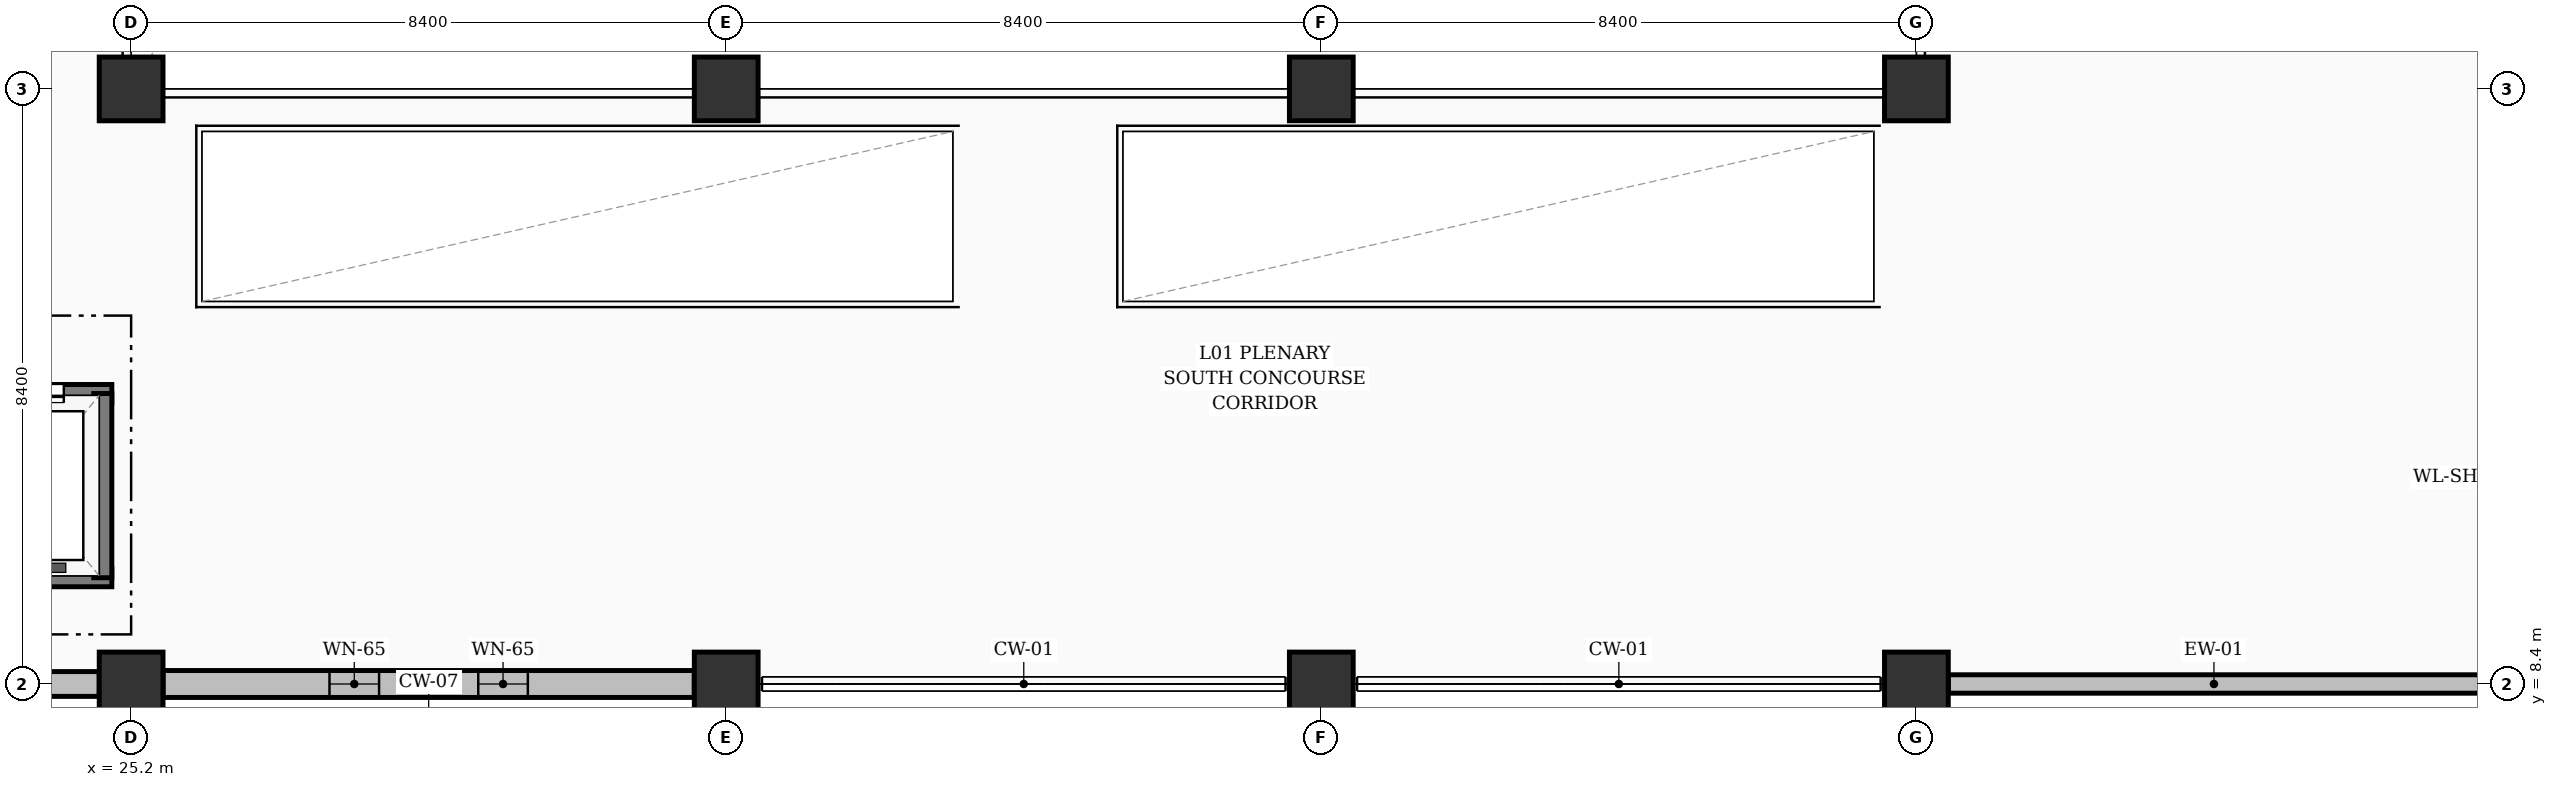
"""IFC4 building model, lengths in metres.
Left out: names, types, materials, properties, quantities, classifications, styles, units other than length and angle.
Written with IfcOpenShell. Run it as: python <this file> out.ifc"""

import sys

from ifc_helpers import new_model, si_unit, direction, frame, frame_2d, origin, origin_2d, place, context, subcontext, project, spatial, rectangle, extrude, element, fill, save


model = new_model("IFC4")
c1 = context("Model", 3, precision=1e-05, world=origin(), true_north=direction((0.0, 1.0)))
c2 = subcontext(c1, "Body", "Model", "MODEL_VIEW")
j1 = project(units=[si_unit("LENGTHUNIT", "METRE"), si_unit("PLANEANGLEUNIT", "RADIAN")], contexts=[c1])
p1 = place(None, origin())
s1 = spatial("IfcSite", under=j1, at=p1, CompositionType="ELEMENT")
p2 = place(p1, origin())
s2 = spatial("IfcBuilding", under=s1, at=p2, CompositionType="ELEMENT")
p3 = place(p2, frame((0.0, 0.0, 3.92)))
s3 = spatial("IfcBuildingStorey", under=s2, at=p3, CompositionType="ELEMENT", Elevation=3.92)
for number, where, z_axis, x_axis in (
    (1, (25.2, 8.4, 0.0), (0.0, 0.0, 1.0), (1.0, 0.0, 0.0)),
    (2, (25.2, 16.8, 0.0), (0.0, 0.0, 1.0), (1.0, 0.0, 0.0)),
    (3, (33.6, 8.4, 0.0), (0.0, 0.0, 1.0), (1.0, 0.0, 0.0)),
    (4, (33.6, 16.8, 0.0), (0.0, 0.0, 1.0), (1.0, 0.0, 0.0)),
    (5, (42.0, 8.4, 0.0), (0.0, 0.0, 1.0), (1.0, 0.0, 0.0)),
    (6, (42.0, 16.8, 0.0), (0.0, 0.0, 1.0), (1.0, 0.0, 0.0)),
    (7, (50.4, 8.4, 0.0), (0.0, 0.0, 1.0), (1.0, 0.0, 0.0)),
    (8, (50.4, 16.8, 0.0), (0.0, 0.0, 1.0), (1.0, 0.0, 0.0)),
):
    element("IfcColumn", number, at=place(p3, frame(where, z_axis=z_axis, x_axis=x_axis)), inside=s3, PredefinedType="COLUMN", context=c2, shape_type="SweptSolid", body=[
        extrude(rectangle(XDim=0.9, YDim=0.9, at=origin_2d()), origin(), (0.0, 0.0, 1.0), 3.64),
    ])
p4 = place(p3, frame((17.251, 8.4, 0.0), z_axis=(0.0, 0.0, 1.0), x_axis=(1.0, 0.0, 0.0)))
e9 = element("IfcWall", 9, at=p4, inside=s3, PredefinedType="SOLIDWALL", context=c2, shape_type="SweptSolid", body=[
    extrude(rectangle(XDim=7.498, YDim=0.35, at=frame_2d((3.749, 0.0))), origin(), (0.0, 0.0, 1.0), 2.445),
])
p5 = place(p3, frame((25.651, 8.4, 0.0), z_axis=(0.0, 0.0, 1.0), x_axis=(1.0, 0.0, 0.0)))
e10 = element("IfcWall", 10, at=p5, inside=s3, PredefinedType="SOLIDWALL", context=c2, shape_type="SweptSolid", body=[
    extrude(rectangle(XDim=7.498, YDim=0.38, at=frame_2d((3.749, 0.0))), origin(), (0.0, 0.0, 1.0), 2.445),
])
p6 = place(p5, frame((2.349, 0.0, 0.3)))
e11 = element("IfcOpeningElement", 11, at=p6, cuts=e10, PredefinedType="OPENING", context=c2, shape_type="SweptSolid", body=[
    extrude(rectangle(XDim=0.7, YDim=1.9, at=frame_2d((0.35, 0.95))), frame((0.0, 0.2, 0.0), z_axis=(0.0, -1.0, 0.0), x_axis=(1.0, 0.0, 0.0)), (0.0, 0.0, 1.0), 0.4),
])
p7 = place(p5, frame((4.449, 0.0, 0.3)))
e12 = element("IfcOpeningElement", 12, at=p7, cuts=e10, PredefinedType="OPENING", context=c2, shape_type="SweptSolid", body=[
    extrude(rectangle(XDim=0.7, YDim=1.9, at=frame_2d((0.35, 0.95))), frame((0.0, 0.2, 0.0), z_axis=(0.0, -1.0, 0.0), x_axis=(1.0, 0.0, 0.0)), (0.0, 0.0, 1.0), 0.4),
])
p8 = place(p3, frame((50.851, 8.4, 0.0), z_axis=(0.0, 0.0, 1.0), x_axis=(1.0, 0.0, 0.0)))
e13 = element("IfcWall", 13, at=p8, inside=s3, PredefinedType="SOLIDWALL", context=c2, shape_type="SweptSolid", body=[
    extrude(rectangle(XDim=7.498, YDim=0.26, at=frame_2d((3.749, 0.0))), origin(), (0.0, 0.0, 1.0), 2.445),
])
p9 = place(p3, frame((22.472, 9.9, 0.0), z_axis=(0.0, 0.0, 1.0), x_axis=(1.0, 0.0, 0.0)))
e14 = element("IfcWall", 14, at=p9, inside=s3, PredefinedType="SOLIDWALL", context=c2, shape_type="SweptSolid", body=[
    extrude(rectangle(XDim=2.455, YDim=0.255, at=frame_2d((1.228, 0.0))), origin(), (0.0, 0.0, 1.0), 3.36),
])
p10 = place(p3, frame((22.472, 12.5, 0.0), z_axis=(0.0, 0.0, 1.0), x_axis=(1.0, 0.0, 0.0)))
e15 = element("IfcWall", 15, at=p10, inside=s3, PredefinedType="SOLIDWALL", context=c2, shape_type="SweptSolid", body=[
    extrude(rectangle(XDim=2.455, YDim=0.255, at=frame_2d((1.228, 0.0))), origin(), (0.0, 0.0, 1.0), 3.36),
])
p11 = place(p10, frame((0.677, 0.0, 0.0)))
e16 = element("IfcOpeningElement", 16, at=p11, cuts=e15, PredefinedType="OPENING", context=c2, shape_type="SweptSolid", body=[
    extrude(rectangle(XDim=1.1, YDim=2.15, at=frame_2d((0.55, 1.075))), frame((0.0, 0.137, 0.0), z_axis=(0.0, -1.0, 0.0), x_axis=(1.0, 0.0, 0.0)), (0.0, 0.0, 1.0), 0.275),
])
p12 = place(p3, frame((24.8, 9.9, 0.0), z_axis=(0.0, 0.0, 1.0), x_axis=(0.0, 1.0, 0.0)))
e17 = element("IfcWall", 17, at=p12, inside=s3, PredefinedType="SOLIDWALL", context=c2, shape_type="SweptSolid", body=[
    extrude(rectangle(XDim=2.6, YDim=0.255, at=frame_2d((1.3, 0.0))), origin(), (0.0, 0.0, 1.0), 3.36),
])
p13 = place(p6, origin())
e18 = element("IfcWindow", 18, at=p13, inside=s3, PartitioningType="SINGLE_PANEL", PredefinedType="WINDOW", context=c2, shape_type="SweptSolid", body=[
    extrude(rectangle(XDim=0.7, YDim=1.9, at=frame_2d((0.35, 0.95))), frame((0.0, 0.03, 0.0), z_axis=(0.0, -1.0, 0.0), x_axis=(1.0, 0.0, 0.0)), (0.0, 0.0, 1.0), 0.06),
])
fill(e11, e18)
p14 = place(p7, origin())
e19 = element("IfcWindow", 19, at=p14, inside=s3, PartitioningType="SINGLE_PANEL", PredefinedType="WINDOW", context=c2, shape_type="SweptSolid", body=[
    extrude(rectangle(XDim=0.7, YDim=1.9, at=frame_2d((0.35, 0.95))), frame((0.0, 0.03, 0.0), z_axis=(0.0, -1.0, 0.0), x_axis=(1.0, 0.0, 0.0)), (0.0, 0.0, 1.0), 0.06),
])
fill(e12, e19)
p15 = place(p11, origin())
e20 = element("IfcDoor", 20, at=p15, inside=s3, OperationType="DOUBLE_DOOR_SLIDING", PredefinedType="DOOR", context=c2, shape_type="SweptSolid", body=[
    extrude(rectangle(XDim=1.1, YDim=2.15, at=frame_2d((0.55, 1.075))), frame((0.0, 0.025, 0.0), z_axis=(0.0, -1.0, 0.0), x_axis=(1.0, 0.0, 0.0)), (0.0, 0.0, 1.0), 0.05),
])
fill(e16, e20)
save(model, sys.argv[1])
